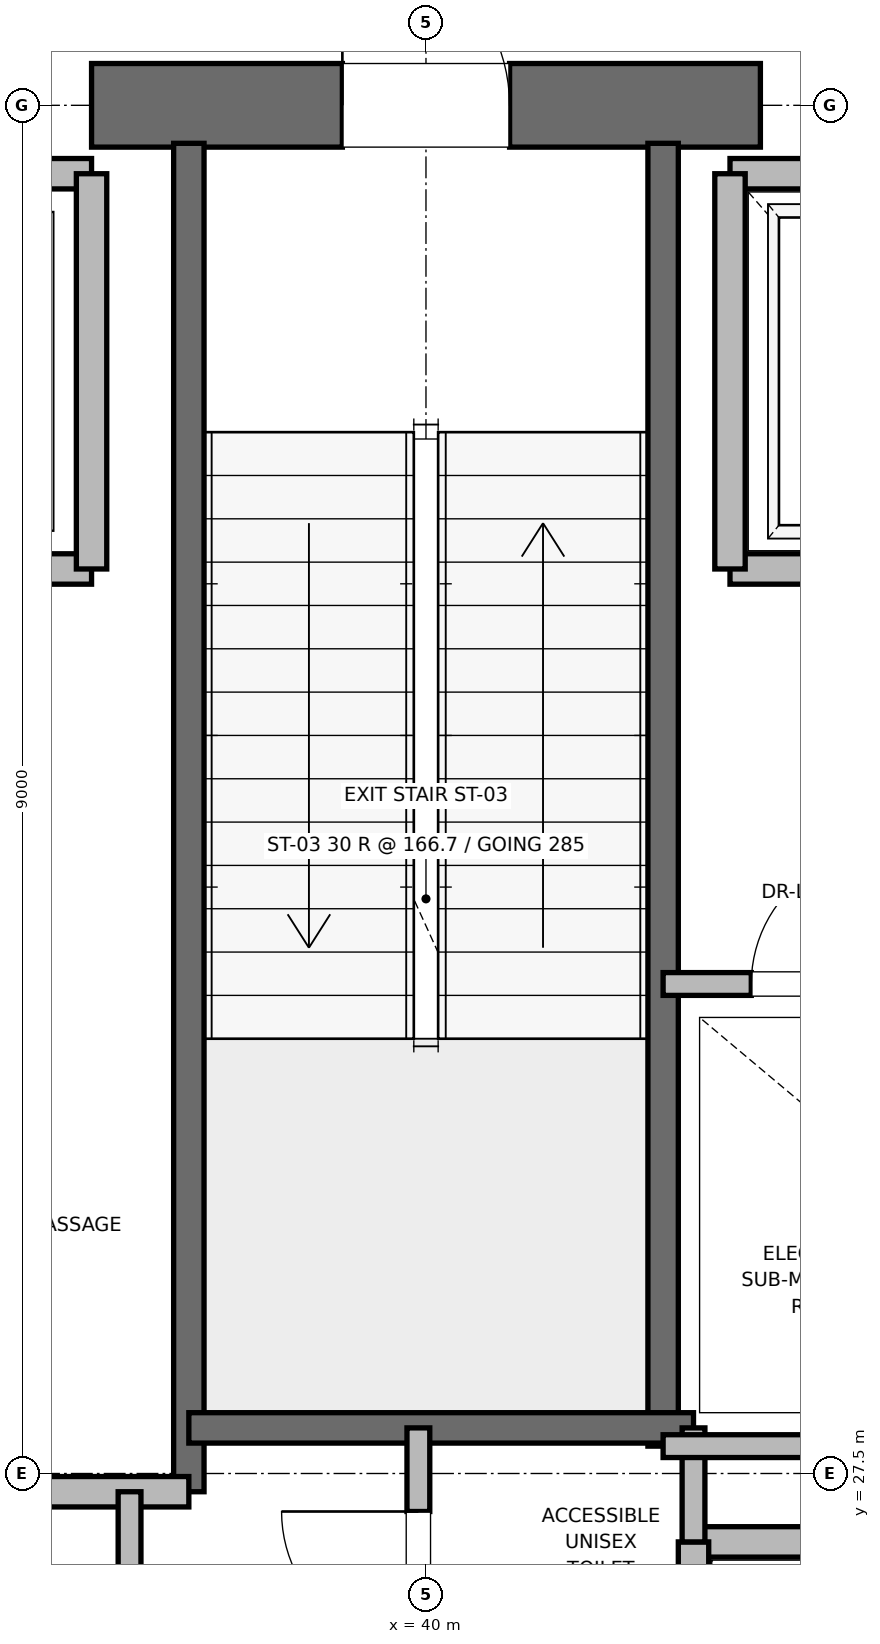
"""IFC4 building model, lengths in metres.
Left out: names, types, materials, properties, quantities, classifications, styles, units other than length and angle.
Written with IfcOpenShell. Run it as: python <this file> out.ifc"""

import sys

from ifc_helpers import new_model, si_unit, direction, frame, frame_2d, origin, place, context, subcontext, project, spatial, rectangle, extrude, element, fill, save


model = new_model("IFC4")
c1 = context("Model", 3, precision=1e-05, world=origin(), true_north=direction((0.0, 1.0)))
c2 = subcontext(c1, "Body", "Model", "MODEL_VIEW")
j1 = project(units=[si_unit("LENGTHUNIT", "METRE"), si_unit("PLANEANGLEUNIT", "RADIAN")], contexts=[c1])
p1 = place(None, origin())
s1 = spatial("IfcSite", under=j1, at=p1, CompositionType="ELEMENT")
p2 = place(p1, origin())
s2 = spatial("IfcBuilding", under=s1, at=p2, CompositionType="ELEMENT")
p3 = place(p2, frame((0.0, 0.0, 233.2)))
s3 = spatial("IfcBuildingStorey", under=s2, at=p3, CompositionType="ELEMENT", Elevation=233.2)
p4 = place(p3, frame((37.8, 36.5, 0.0), z_axis=(0.0, 0.0, 1.0), x_axis=(1.0, 0.0, 0.0)))
e1 = element("IfcWall", 1, at=p4, inside=s3, PredefinedType="SHEAR", context=c2, shape_type="SweptSolid", body=[
    extrude(rectangle(XDim=4.4, YDim=0.55, at=frame_2d((2.2, 0.0))), origin(), (0.0, 0.0, 1.0), 4.7),
])
p5 = place(p4, frame((1.65, 0.0, 0.0)))
e2 = element("IfcOpeningElement", 2, at=p5, cuts=e1, PredefinedType="OPENING", context=c2, shape_type="SweptSolid", body=[
    extrude(rectangle(XDim=1.1, YDim=2.15, at=frame_2d((0.55, 1.075))), frame((0.0, 0.275, 0.0), z_axis=(0.0, -1.0, 0.0), x_axis=(1.0, 0.0, 0.0)), (0.0, 0.0, 1.0), 0.55),
])
p6 = place(p3, frame((38.44, 27.38, 0.0), z_axis=(0.0, 0.0, 1.0), x_axis=(0.0, 1.0, 0.0)))
e3 = element("IfcWall", 3, at=p6, inside=s3, PredefinedType="SOLIDWALL", context=c2, shape_type="SweptSolid", body=[
    extrude(rectangle(XDim=8.87, YDim=0.2, at=frame_2d((4.435, 0.0))), origin(), (0.0, 0.0, 1.0), 4.7),
])
p7 = place(p3, frame((41.56, 27.68, 0.0), z_axis=(0.0, 0.0, 1.0), x_axis=(0.0, 1.0, 0.0)))
e4 = element("IfcWall", 4, at=p7, inside=s3, PredefinedType="SOLIDWALL", context=c2, shape_type="SweptSolid", body=[
    extrude(rectangle(XDim=8.57, YDim=0.2, at=frame_2d((4.285, 0.0))), origin(), (0.0, 0.0, 1.0), 4.7),
])
p8 = place(p3, frame((38.44, 27.8, 0.0), z_axis=(0.0, 0.0, 1.0), x_axis=(1.0, 0.0, 0.0)))
e5 = element("IfcWall", 5, at=p8, inside=s3, PredefinedType="SOLIDWALL", context=c2, shape_type="SweptSolid", body=[
    extrude(rectangle(XDim=3.32, YDim=0.2, at=frame_2d((1.66, 0.0))), origin(), (0.0, 0.0, 1.0), 4.7),
])
p9 = place(p3, frame((32.82, 27.38, 0.0), z_axis=(0.0, 0.0, 1.0), x_axis=(1.0, 0.0, 0.0)))
e6 = element("IfcWall", 6, at=p9, inside=s3, PredefinedType="PARTITIONING", context=c2, shape_type="SweptSolid", body=[
    extrude(rectangle(XDim=5.62, YDim=0.2, at=frame_2d((2.81, 0.0))), origin(), (0.0, 0.0, 1.0), 4.7),
])
p10 = place(p3, frame((43.44, 27.05, 0.0), z_axis=(0.0, 0.0, 1.0), x_axis=(-1.0, 0.0, 0.0)))
e7 = element("IfcWall", 7, at=p10, inside=s3, PredefinedType="SOLIDWALL", context=c2, shape_type="SweptSolid", body=[
    extrude(rectangle(XDim=1.68, YDim=0.2, at=frame_2d((0.84, 0.0))), origin(), (0.0, 0.0, 1.0), 4.7),
])
p11 = place(p3, frame((41.76, 27.05, 0.0), z_axis=(0.0, 0.0, 1.0), x_axis=(0.0, -1.0, 0.0)))
e8 = element("IfcWall", 8, at=p11, inside=s3, PredefinedType="SOLIDWALL", context=c2, shape_type="SweptSolid", body=[
    extrude(rectangle(XDim=2.6, YDim=0.2, at=frame_2d((1.3, 0.0))), origin(), (0.0, 0.0, 1.0), 4.7),
])
p12 = place(p3, frame((35.5, 33.45, 0.0), z_axis=(0.0, 0.0, 1.0), x_axis=(1.0, 0.0, 0.0)))
e9 = element("IfcWall", 9, at=p12, inside=s3, PredefinedType="SOLIDWALL", context=c2, shape_type="SweptSolid", body=[
    extrude(rectangle(XDim=2.3, YDim=0.2, at=frame_2d((1.15, 0.0))), origin(), (0.0, 0.0, 1.0), 4.7),
])
p13 = place(p12, frame((0.6, 0.0, 0.0)))
e10 = element("IfcOpeningElement", 10, at=p13, cuts=e9, PredefinedType="OPENING", context=c2, shape_type="SweptSolid", body=[
    extrude(rectangle(XDim=1.1, YDim=2.2, at=frame_2d((0.55, 1.1))), frame((0.0, 0.1, 0.0), z_axis=(0.0, -1.0, 0.0), x_axis=(1.0, 0.0, 0.0)), (0.0, 0.0, 1.0), 0.2),
])
p14 = place(p3, frame((37.8, 36.05, 0.0), z_axis=(0.0, 0.0, 1.0), x_axis=(-1.0, 0.0, 0.0)))
e11 = element("IfcWall", 11, at=p14, inside=s3, PredefinedType="SOLIDWALL", context=c2, shape_type="SweptSolid", body=[
    extrude(rectangle(XDim=2.3, YDim=0.2, at=frame_2d((1.15, 0.0))), origin(), (0.0, 0.0, 1.0), 3.68),
])
p15 = place(p3, frame((37.8, 33.45, 0.0), z_axis=(0.0, 0.0, 1.0), x_axis=(0.0, 1.0, 0.0)))
e12 = element("IfcWall", 12, at=p15, inside=s3, PredefinedType="SOLIDWALL", context=c2, shape_type="SweptSolid", body=[
    extrude(rectangle(XDim=2.6, YDim=0.2, at=frame_2d((1.3, 0.0))), origin(), (0.0, 0.0, 1.0), 3.68),
])
p16 = place(p3, frame((42.0, 33.45, 0.0), z_axis=(0.0, 0.0, 1.0), x_axis=(1.0, 0.0, 0.0)))
e13 = element("IfcWall", 13, at=p16, inside=s3, PredefinedType="SOLIDWALL", context=c2, shape_type="SweptSolid", body=[
    extrude(rectangle(XDim=2.3, YDim=0.2, at=frame_2d((1.15, 0.0))), origin(), (0.0, 0.0, 1.0), 4.7),
])
p17 = place(p16, frame((0.6, 0.0, 0.0)))
e14 = element("IfcOpeningElement", 14, at=p17, cuts=e13, PredefinedType="OPENING", context=c2, shape_type="SweptSolid", body=[
    extrude(rectangle(XDim=1.1, YDim=2.2, at=frame_2d((0.55, 1.1))), frame((0.0, 0.1, 0.0), z_axis=(0.0, -1.0, 0.0), x_axis=(1.0, 0.0, 0.0)), (0.0, 0.0, 1.0), 0.2),
])
p18 = place(p3, frame((44.3, 36.05, 0.0), z_axis=(0.0, 0.0, 1.0), x_axis=(-1.0, 0.0, 0.0)))
e15 = element("IfcWall", 15, at=p18, inside=s3, PredefinedType="SOLIDWALL", context=c2, shape_type="SweptSolid", body=[
    extrude(rectangle(XDim=2.3, YDim=0.2, at=frame_2d((1.15, 0.0))), origin(), (0.0, 0.0, 1.0), 3.68),
])
p19 = place(p3, frame((42.0, 36.05, 0.0), z_axis=(0.0, 0.0, 1.0), x_axis=(0.0, -1.0, 0.0)))
e16 = element("IfcWall", 16, at=p19, inside=s3, PredefinedType="SOLIDWALL", context=c2, shape_type="SweptSolid", body=[
    extrude(rectangle(XDim=2.6, YDim=0.2, at=frame_2d((1.3, 0.0))), origin(), (0.0, 0.0, 1.0), 3.68),
])
p20 = place(p3, frame((41.76, 27.05, 0.0), z_axis=(0.0, 0.0, 1.0), x_axis=(0.0, 1.0, 0.0)))
e17 = element("IfcWall", 17, at=p20, inside=s3, PredefinedType="PARTITIONING", context=c2, shape_type="SweptSolid", body=[
    extrude(rectangle(XDim=0.75, YDim=0.15, at=frame_2d((0.375, 0.0))), origin(), (0.0, 0.0, 1.0), 2.85),
])
p21 = place(p3, frame((39.95, 25.8, 0.0), z_axis=(0.0, 0.0, 1.0), x_axis=(0.0, 1.0, 0.0)))
e18 = element("IfcWall", 18, at=p21, inside=s3, PredefinedType="PARTITIONING", context=c2, shape_type="SweptSolid", body=[
    extrude(rectangle(XDim=2.0, YDim=0.15, at=frame_2d((1.0, 0.0))), origin(), (0.0, 0.0, 1.0), 2.85),
])
p22 = place(p21, frame((0.55, 0.0, 0.0)))
e19 = element("IfcOpeningElement", 19, at=p22, cuts=e18, PredefinedType="OPENING", context=c2, shape_type="SweptSolid", body=[
    extrude(rectangle(XDim=0.9, YDim=2.1, at=frame_2d((0.45, 1.05))), frame((0.0, 0.075, 0.0), z_axis=(0.0, -1.0, 0.0), x_axis=(1.0, 0.0, 0.0)), (0.0, 0.0, 1.0), 0.15),
])
p23 = place(p3, frame((38.05, 24.5, 0.0), z_axis=(0.0, 0.0, 1.0), x_axis=(0.0, 1.0, 0.0)))
e20 = element("IfcWall", 20, at=p23, inside=s3, PredefinedType="PARTITIONING", context=c2, shape_type="SweptSolid", body=[
    extrude(rectangle(XDim=2.88, YDim=0.15, at=frame_2d((1.44, 0.0))), origin(), (0.0, 0.0, 1.0), 2.85),
])
p24 = place(p23, frame((0.94, 0.0, 0.0)))
e21 = element("IfcOpeningElement", 21, at=p24, cuts=e20, PredefinedType="OPENING", context=c2, shape_type="SweptSolid", body=[
    extrude(rectangle(XDim=1.0, YDim=2.15, at=frame_2d((0.5, 1.075))), frame((0.0, 0.075, 0.0), z_axis=(0.0, -1.0, 0.0), x_axis=(1.0, 0.0, 0.0)), (0.0, 0.0, 1.0), 0.15),
])
p25 = place(p3, frame((41.56, 27.68, 0.0), z_axis=(0.0, 0.0, 1.0), x_axis=(1.0, 0.0, 0.0)))
e22 = element("IfcWall", 22, at=p25, inside=s3, PredefinedType="PARTITIONING", context=c2, shape_type="SweptSolid", body=[
    extrude(rectangle(XDim=3.59, YDim=0.15, at=frame_2d((1.795, 0.0))), origin(), (0.0, 0.0, 1.0), 2.85),
])
p26 = place(p3, frame((41.56, 30.72, 0.0), z_axis=(0.0, 0.0, 1.0), x_axis=(1.0, 0.0, 0.0)))
e23 = element("IfcWall", 23, at=p26, inside=s3, PredefinedType="PARTITIONING", context=c2, shape_type="SweptSolid", body=[
    extrude(rectangle(XDim=2.04, YDim=0.15, at=frame_2d((1.02, 0.0))), origin(), (0.0, 0.0, 1.0), 2.85),
])
p27 = place(p26, frame((0.58, 0.0, 0.0)))
e24 = element("IfcOpeningElement", 24, at=p27, cuts=e23, PredefinedType="OPENING", context=c2, shape_type="SweptSolid", body=[
    extrude(rectangle(XDim=0.88, YDim=2.1, at=frame_2d((0.44, 1.05))), frame((0.0, 0.075, 0.0), z_axis=(0.0, -1.0, 0.0), x_axis=(1.0, 0.0, 0.0)), (0.0, 0.0, 1.0), 0.15),
])
p28 = place(p5, origin())
e25 = element("IfcDoor", 25, at=p28, inside=s3, OperationType="SINGLE_SWING_LEFT", PredefinedType="DOOR", context=c2, shape_type="SweptSolid", body=[
    extrude(rectangle(XDim=1.1, YDim=2.15, at=frame_2d((0.55, 1.075))), frame((0.0, 0.025, 0.0), z_axis=(0.0, -1.0, 0.0), x_axis=(1.0, 0.0, 0.0)), (0.0, 0.0, 1.0), 0.05),
])
fill(e2, e25)
p29 = place(p22, origin())
e26 = element("IfcDoor", 26, at=p29, inside=s3, OperationType="SINGLE_SWING_RIGHT", PredefinedType="DOOR", context=c2, shape_type="SweptSolid", body=[
    extrude(rectangle(XDim=0.9, YDim=2.1, at=frame_2d((0.45, 1.05))), frame((0.0, 0.025, 0.0), z_axis=(0.0, -1.0, 0.0), x_axis=(1.0, 0.0, 0.0)), (0.0, 0.0, 1.0), 0.05),
])
fill(e19, e26)
p30 = place(p27, origin())
e27 = element("IfcDoor", 27, at=p30, inside=s3, OperationType="SINGLE_SWING_RIGHT", PredefinedType="DOOR", context=c2, shape_type="SweptSolid", body=[
    extrude(rectangle(XDim=0.88, YDim=2.1, at=frame_2d((0.44, 1.05))), frame((0.0, 0.025, 0.0), z_axis=(0.0, -1.0, 0.0), x_axis=(1.0, 0.0, 0.0)), (0.0, 0.0, 1.0), 0.05),
])
fill(e24, e27)
save(model, sys.argv[1])
